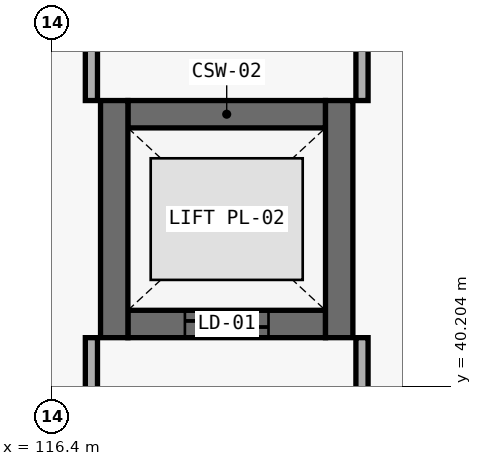
"""IFC4 building model, lengths in metres.
Left out: names, types, materials, properties, quantities, classifications, styles, units other than length and angle.
Written with IfcOpenShell. Run it as: python <this file> out.ifc"""

import sys

from ifc_helpers import new_model, si_unit, direction, frame, frame_2d, origin, place, context, subcontext, project, spatial, rectangle, extrude, element, fill, save


model = new_model("IFC4")
c1 = context("Model", 3, precision=1e-05, world=origin(), true_north=direction((0.0, 1.0)))
c2 = subcontext(c1, "Body", "Model", "MODEL_VIEW")
j1 = project(units=[si_unit("LENGTHUNIT", "METRE"), si_unit("PLANEANGLEUNIT", "RADIAN")], contexts=[c1])
p1 = place(None, origin())
s1 = spatial("IfcSite", under=j1, at=p1, CompositionType="ELEMENT")
p2 = place(p1, origin())
s2 = spatial("IfcBuilding", under=s1, at=p2, CompositionType="ELEMENT")
p3 = place(p2, frame((0.0, 0.0, -4.8)))
s3 = spatial("IfcBuildingStorey", under=s2, at=p3, CompositionType="ELEMENT", Elevation=-4.8)
p4 = place(p3, frame((117.4, 43.78, 0.0), z_axis=(0.0, 0.0, 1.0), x_axis=(1.0, 0.0, 0.0)))
e1 = element("IfcWall", 1, at=p4, inside=s3, PredefinedType="SHEAR", context=c2, shape_type="SweptSolid", body=[
    extrude(rectangle(XDim=2.6, YDim=0.36, at=frame_2d((1.3, 0.0))), origin(), (0.0, 0.0, 1.0), 4.38),
])
p5 = place(p3, frame((117.4, 41.02, 0.0), z_axis=(0.0, 0.0, 1.0), x_axis=(1.0, 0.0, 0.0)))
e2 = element("IfcWall", 2, at=p5, inside=s3, PredefinedType="SHEAR", context=c2, shape_type="SweptSolid", body=[
    extrude(rectangle(XDim=2.6, YDim=0.36, at=frame_2d((1.3, 0.0))), origin(), (0.0, 0.0, 1.0), 4.38),
])
p6 = place(p5, frame((0.75, 0.0, 0.0)))
e3 = element("IfcOpeningElement", 3, at=p6, cuts=e2, PredefinedType="OPENING", context=c2, shape_type="SweptSolid", body=[
    extrude(rectangle(XDim=1.1, YDim=2.15, at=frame_2d((0.55, 1.075))), frame((0.0, 0.195, 0.0), z_axis=(0.0, -1.0, 0.0), x_axis=(1.0, 0.0, 0.0)), (0.0, 0.0, 1.0), 0.39),
])
for number, where, z_axis, x_axis in (
    (4, (117.22, 40.84, 0.0), (0.0, 0.0, 1.0), (0.0, 1.0, 0.0)),
    (5, (120.18, 40.84, 0.0), (0.0, 0.0, 1.0), (0.0, 1.0, 0.0)),
):
    element("IfcWall", number, at=place(p3, frame(where, z_axis=z_axis, x_axis=x_axis)), inside=s3, PredefinedType="SHEAR", context=c2, shape_type="SweptSolid", body=[
        extrude(rectangle(XDim=3.12, YDim=0.36, at=frame_2d((1.56, 0.0))), origin(), (0.0, 0.0, 1.0), 4.38),
    ])
p7 = place(p3, frame((116.92, 35.8, 0.0), z_axis=(0.0, 0.0, 1.0), x_axis=(0.0, 1.0, 0.0)))
e6 = element("IfcWall", 6, at=p7, inside=s3, PredefinedType="PARTITIONING", context=c2, shape_type="SweptSolid", body=[
    extrude(rectangle(XDim=5.04, YDim=0.16, at=frame_2d((2.52, 0.0))), origin(), (0.0, 0.0, 1.0), 3.26),
])
p8 = place(p3, frame((116.92, 43.96, 0.0), z_axis=(0.0, 0.0, 1.0), x_axis=(0.0, 1.0, 0.0)))
e7 = element("IfcWall", 7, at=p8, inside=s3, PredefinedType="PARTITIONING", context=c2, shape_type="SweptSolid", body=[
    extrude(rectangle(XDim=1.84, YDim=0.16, at=frame_2d((0.92, 0.0))), origin(), (0.0, 0.0, 1.0), 3.26),
])
p9 = place(p3, frame((120.48, 35.8, 0.0), z_axis=(0.0, 0.0, 1.0), x_axis=(0.0, 1.0, 0.0)))
e8 = element("IfcWall", 8, at=p9, inside=s3, PredefinedType="PARTITIONING", context=c2, shape_type="SweptSolid", body=[
    extrude(rectangle(XDim=5.04, YDim=0.16, at=frame_2d((2.52, 0.0))), origin(), (0.0, 0.0, 1.0), 3.26),
])
p10 = place(p3, frame((120.48, 43.96, 0.0), z_axis=(0.0, 0.0, 1.0), x_axis=(0.0, 1.0, 0.0)))
e9 = element("IfcWall", 9, at=p10, inside=s3, PredefinedType="PARTITIONING", context=c2, shape_type="SweptSolid", body=[
    extrude(rectangle(XDim=1.84, YDim=0.16, at=frame_2d((0.92, 0.0))), origin(), (0.0, 0.0, 1.0), 3.26),
])
p11 = place(p6, origin())
e10 = element("IfcDoor", 10, at=p11, inside=s3, OperationType="DOUBLE_DOOR_SLIDING", PredefinedType="DOOR", context=c2, shape_type="SweptSolid", body=[
    extrude(rectangle(XDim=1.1, YDim=2.15, at=frame_2d((0.55, 1.075))), frame((0.0, 0.025, 0.0), z_axis=(0.0, -1.0, 0.0), x_axis=(1.0, 0.0, 0.0)), (0.0, 0.0, 1.0), 0.05),
])
fill(e3, e10)
save(model, sys.argv[1])
